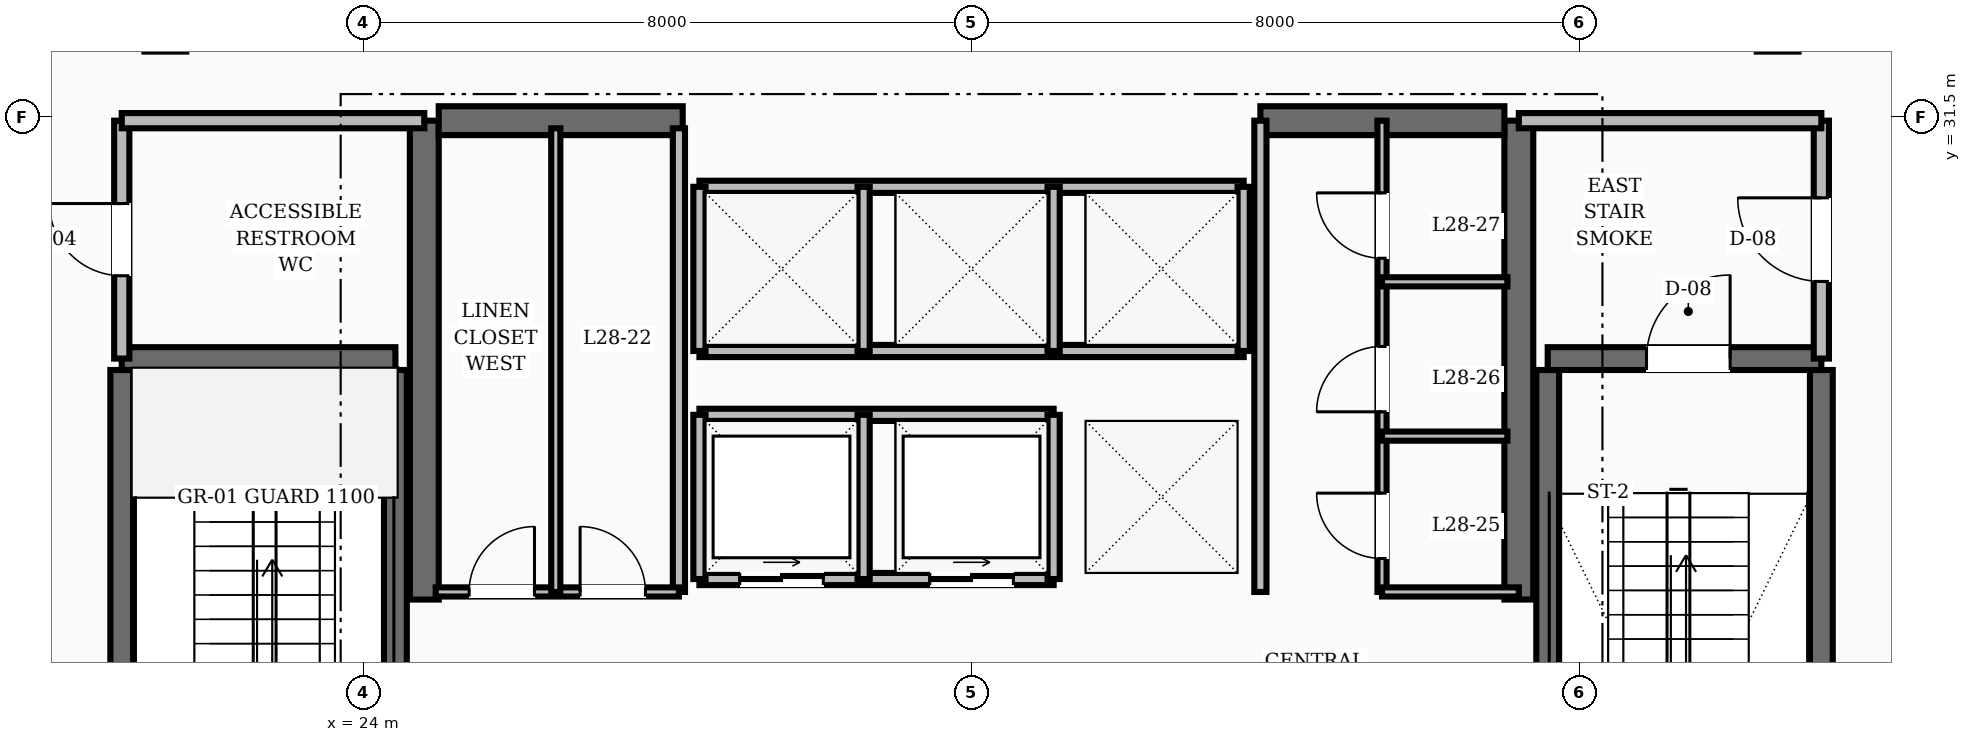
"""IFC4 building model, lengths in metres.
Left out: names, types, materials, properties, quantities, classifications, styles, units other than length and angle.
Written with IfcOpenShell. Run it as: python <this file> out.ifc"""

import sys

from ifc_helpers import new_model, si_unit, direction, frame, frame_2d, origin, place, context, subcontext, project, spatial, rectangle, extrude, element, fill, save


model = new_model("IFC4")
c1 = context("Model", 3, precision=1e-05, world=origin(), true_north=direction((0.0, 1.0)))
c2 = subcontext(c1, "Body", "Model", "MODEL_VIEW")
j1 = project(units=[si_unit("LENGTHUNIT", "METRE"), si_unit("PLANEANGLEUNIT", "RADIAN")], contexts=[c1])
p1 = place(None, origin())
s1 = spatial("IfcSite", under=j1, at=p1, CompositionType="ELEMENT")
p2 = place(p1, origin())
s2 = spatial("IfcBuilding", under=s1, at=p2, CompositionType="ELEMENT")
p3 = place(p2, frame((0.0, 0.0, 110.8)))
s3 = spatial("IfcBuildingStorey", under=s2, at=p3, CompositionType="ELEMENT", Elevation=110.8)
for number, where, z_axis, x_axis in (
    (1, (24.8, 25.15, 0.0), (0.0, 0.0, 1.0), (0.0, 1.0, 0.0)),
    (2, (39.2, 25.15, 0.0), (0.0, 0.0, 1.0), (0.0, 1.0, 0.0)),
):
    element("IfcWall", number, at=place(p3, frame(where, z_axis=z_axis, x_axis=x_axis)), inside=s3, PredefinedType="SHEAR", context=c2, shape_type="SweptSolid", body=[
        extrude(rectangle(XDim=6.3, YDim=0.38, at=frame_2d((3.15, 0.0))), origin(), (0.0, 0.0, 1.0), 6.4),
    ])
for number, where, z_axis, x_axis in (
    (3, (24.99, 31.45, 0.0), (0.0, 0.0, 1.0), (1.0, 0.0, 0.0)),
    (4, (35.8, 31.45, 0.0), (0.0, 0.0, 1.0), (1.0, 0.0, 0.0)),
):
    element("IfcWall", number, at=place(p3, frame(where, z_axis=z_axis, x_axis=x_axis)), inside=s3, PredefinedType="SHEAR", context=c2, shape_type="SweptSolid", body=[
        extrude(rectangle(XDim=3.21, YDim=0.38, at=frame_2d((1.605, 0.0))), origin(), (0.0, 0.0, 1.0), 6.4),
    ])
for number, where, z_axis, x_axis in (
    (5, (20.82, 19.43, 0.0), (0.0, 0.0, 1.0), (0.0, 1.0, 0.0)),
    (6, (24.42, 19.43, 0.0), (0.0, 0.0, 1.0), (0.0, 1.0, 0.0)),
):
    element("IfcWall", number, at=place(p3, frame(where, z_axis=z_axis, x_axis=x_axis)), inside=s3, PredefinedType="SHEAR", context=c2, shape_type="SweptSolid", body=[
        extrude(rectangle(XDim=8.74, YDim=0.3, at=frame_2d((4.37, 0.0))), origin(), (0.0, 0.0, 1.0), 6.4),
    ])
p4 = place(p3, frame((20.82, 28.32, 0.0), z_axis=(0.0, 0.0, 1.0), x_axis=(1.0, 0.0, 0.0)))
e7 = element("IfcWall", 7, at=p4, inside=s3, PredefinedType="SHEAR", context=c2, shape_type="SweptSolid", body=[
    extrude(rectangle(XDim=3.6, YDim=0.3, at=frame_2d((1.8, 0.0))), origin(), (0.0, 0.0, 1.0), 6.4),
])
for number, where, z_axis, x_axis in (
    (8, (43.18, 19.43, 0.0), (0.0, 0.0, 1.0), (0.0, 1.0, 0.0)),
    (9, (39.58, 19.43, 0.0), (0.0, 0.0, 1.0), (0.0, 1.0, 0.0)),
):
    element("IfcWall", number, at=place(p3, frame(where, z_axis=z_axis, x_axis=x_axis)), inside=s3, PredefinedType="SHEAR", context=c2, shape_type="SweptSolid", body=[
        extrude(rectangle(XDim=8.74, YDim=0.3, at=frame_2d((4.37, 0.0))), origin(), (0.0, 0.0, 1.0), 6.4),
    ])
p5 = place(p3, frame((39.58, 28.32, 0.0), z_axis=(0.0, 0.0, 1.0), x_axis=(1.0, 0.0, 0.0)))
e10 = element("IfcWall", 10, at=p5, inside=s3, PredefinedType="SHEAR", context=c2, shape_type="SweptSolid", body=[
    extrude(rectangle(XDim=3.6, YDim=0.3, at=frame_2d((1.8, 0.0))), origin(), (0.0, 0.0, 1.0), 6.4),
])
p6 = place(p5, frame((1.3, 0.0, 0.0)))
e11 = element("IfcOpeningElement", 11, at=p6, cuts=e10, PredefinedType="OPENING", context=c2, shape_type="SweptSolid", body=[
    extrude(rectangle(XDim=1.1, YDim=2.1, at=frame_2d((0.55, 1.05))), frame((0.0, 0.16, 0.0), z_axis=(0.0, -1.0, 0.0), x_axis=(1.0, 0.0, 0.0)), (0.0, 0.0, 1.0), 0.32),
])
p7 = place(p3, frame((43.18, 28.32, 0.0), z_axis=(0.0, 0.0, 1.0), x_axis=(0.0, 1.0, 0.0)))
e12 = element("IfcWall", 12, at=p7, inside=s3, PredefinedType="SOLIDWALL", context=c2, shape_type="SweptSolid", body=[
    extrude(rectangle(XDim=3.13, YDim=0.2, at=frame_2d((1.565, 0.0))), origin(), (0.0, 0.0, 1.0), 5.12),
])
p8 = place(p7, frame((1.015, 0.0, 0.0)))
e13 = element("IfcOpeningElement", 13, at=p8, cuts=e12, PredefinedType="OPENING", context=c2, shape_type="SweptSolid", body=[
    extrude(rectangle(XDim=1.1, YDim=2.1, at=frame_2d((0.55, 1.05))), frame((0.0, 0.11, 0.0), z_axis=(0.0, -1.0, 0.0), x_axis=(1.0, 0.0, 0.0)), (0.0, 0.0, 1.0), 0.22),
])
p9 = place(p3, frame((39.2, 31.45, 0.0), z_axis=(0.0, 0.0, 1.0), x_axis=(1.0, 0.0, 0.0)))
e14 = element("IfcWall", 14, at=p9, inside=s3, PredefinedType="SOLIDWALL", context=c2, shape_type="SweptSolid", body=[
    extrude(rectangle(XDim=3.98, YDim=0.2, at=frame_2d((1.99, 0.0))), origin(), (0.0, 0.0, 1.0), 5.12),
])
p10 = place(p3, frame((20.82, 28.32, 0.0), z_axis=(0.0, 0.0, 1.0), x_axis=(0.0, 1.0, 0.0)))
e15 = element("IfcWall", 15, at=p10, inside=s3, PredefinedType="SOLIDWALL", context=c2, shape_type="SweptSolid", body=[
    extrude(rectangle(XDim=3.13, YDim=0.2, at=frame_2d((1.565, 0.0))), origin(), (0.0, 0.0, 1.0), 5.12),
])
p11 = place(p10, frame((1.09, 0.0, 0.0)))
e16 = element("IfcOpeningElement", 16, at=p11, cuts=e15, PredefinedType="OPENING", context=c2, shape_type="SweptSolid", body=[
    extrude(rectangle(XDim=0.95, YDim=2.1, at=frame_2d((0.475, 1.05))), frame((0.0, 0.11, 0.0), z_axis=(0.0, -1.0, 0.0), x_axis=(1.0, 0.0, 0.0)), (0.0, 0.0, 1.0), 0.22),
])
p12 = place(p3, frame((20.82, 31.45, 0.0), z_axis=(0.0, 0.0, 1.0), x_axis=(1.0, 0.0, 0.0)))
e17 = element("IfcWall", 17, at=p12, inside=s3, PredefinedType="SOLIDWALL", context=c2, shape_type="SweptSolid", body=[
    extrude(rectangle(XDim=3.98, YDim=0.2, at=frame_2d((1.99, 0.0))), origin(), (0.0, 0.0, 1.0), 5.12),
])
p13 = place(p3, frame((35.8, 25.25, 0.0), z_axis=(0.0, 0.0, 1.0), x_axis=(0.0, 1.0, 0.0)))
e18 = element("IfcWall", 18, at=p13, inside=s3, PredefinedType="SOLIDWALL", context=c2, shape_type="SweptSolid", body=[
    extrude(rectangle(XDim=6.2, YDim=0.16, at=frame_2d((3.1, 0.0))), origin(), (0.0, 0.0, 1.0), 5.12),
])
for number, where, z_axis, x_axis in (
    (19, (28.42, 30.58, 0.0), (0.0, 0.0, 1.0), (1.0, 0.0, 0.0)),
    (20, (28.42, 28.42, 0.0), (0.0, 0.0, 1.0), (1.0, 0.0, 0.0)),
):
    element("IfcWall", number, at=place(p3, frame(where, z_axis=z_axis, x_axis=x_axis)), inside=s3, PredefinedType="SOLIDWALL", context=c2, shape_type="SweptSolid", body=[
        extrude(rectangle(XDim=7.16, YDim=0.16, at=frame_2d((3.58, 0.0))), origin(), (0.0, 0.0, 1.0), 5.12),
    ])
for number, where, z_axis, x_axis in (
    (21, (28.42, 28.42, 0.0), (0.0, 0.0, 1.0), (0.0, 1.0, 0.0)),
    (22, (30.58, 28.42, 0.0), (0.0, 0.0, 1.0), (0.0, 1.0, 0.0)),
    (23, (33.08, 28.42, 0.0), (0.0, 0.0, 1.0), (0.0, 1.0, 0.0)),
    (24, (35.58, 28.42, 0.0), (0.0, 0.0, 1.0), (0.0, 1.0, 0.0)),
):
    element("IfcWall", number, at=place(p3, frame(where, z_axis=z_axis, x_axis=x_axis)), inside=s3, PredefinedType="SOLIDWALL", context=c2, shape_type="SweptSolid", body=[
        extrude(rectangle(XDim=2.16, YDim=0.16, at=frame_2d((1.08, 0.0))), origin(), (0.0, 0.0, 1.0), 5.12),
    ])
p14 = place(p3, frame((28.42, 25.42, 0.0), z_axis=(0.0, 0.0, 1.0), x_axis=(1.0, 0.0, 0.0)))
e25 = element("IfcWall", 25, at=p14, inside=s3, PredefinedType="SOLIDWALL", context=c2, shape_type="SweptSolid", body=[
    extrude(rectangle(XDim=4.66, YDim=0.16, at=frame_2d((2.33, 0.0))), origin(), (0.0, 0.0, 1.0), 5.12),
])
p15 = place(p14, frame((0.53, 0.0, 0.0)))
e26 = element("IfcOpeningElement", 26, at=p15, cuts=e25, PredefinedType="OPENING", context=c2, shape_type="SweptSolid", body=[
    extrude(rectangle(XDim=1.1, YDim=2.15, at=frame_2d((0.55, 1.075))), frame((0.0, 0.09, 0.0), z_axis=(0.0, -1.0, 0.0), x_axis=(1.0, 0.0, 0.0)), (0.0, 0.0, 1.0), 0.18),
])
p16 = place(p14, frame((3.03, 0.0, 0.0)))
e27 = element("IfcOpeningElement", 27, at=p16, cuts=e25, PredefinedType="OPENING", context=c2, shape_type="SweptSolid", body=[
    extrude(rectangle(XDim=1.1, YDim=2.15, at=frame_2d((0.55, 1.075))), frame((0.0, 0.09, 0.0), z_axis=(0.0, -1.0, 0.0), x_axis=(1.0, 0.0, 0.0)), (0.0, 0.0, 1.0), 0.18),
])
p17 = place(p3, frame((28.42, 27.58, 0.0), z_axis=(0.0, 0.0, 1.0), x_axis=(1.0, 0.0, 0.0)))
e28 = element("IfcWall", 28, at=p17, inside=s3, PredefinedType="SOLIDWALL", context=c2, shape_type="SweptSolid", body=[
    extrude(rectangle(XDim=4.66, YDim=0.16, at=frame_2d((2.33, 0.0))), origin(), (0.0, 0.0, 1.0), 5.12),
])
for number, where, z_axis, x_axis in (
    (29, (28.42, 25.42, 0.0), (0.0, 0.0, 1.0), (0.0, 1.0, 0.0)),
    (30, (30.58, 25.42, 0.0), (0.0, 0.0, 1.0), (0.0, 1.0, 0.0)),
    (31, (33.08, 25.42, 0.0), (0.0, 0.0, 1.0), (0.0, 1.0, 0.0)),
):
    element("IfcWall", number, at=place(p3, frame(where, z_axis=z_axis, x_axis=x_axis)), inside=s3, PredefinedType="SOLIDWALL", context=c2, shape_type="SweptSolid", body=[
        extrude(rectangle(XDim=2.16, YDim=0.16, at=frame_2d((1.08, 0.0))), origin(), (0.0, 0.0, 1.0), 5.12),
    ])
p18 = place(p3, frame((28.15, 25.25, 0.0), z_axis=(0.0, 0.0, 1.0), x_axis=(0.0, 1.0, 0.0)))
e32 = element("IfcWall", 32, at=p18, inside=s3, PredefinedType="SOLIDWALL", context=c2, shape_type="SweptSolid", body=[
    extrude(rectangle(XDim=6.1, YDim=0.16, at=frame_2d((3.05, 0.0))), origin(), (0.0, 0.0, 1.0), 5.12),
])
p19 = place(p3, frame((24.95, 25.25, 0.0), z_axis=(0.0, 0.0, 1.0), x_axis=(1.0, 0.0, 0.0)))
e33 = element("IfcWall", 33, at=p19, inside=s3, PredefinedType="PARTITIONING", context=c2, shape_type="SweptSolid", body=[
    extrude(rectangle(XDim=3.2, YDim=0.12, at=frame_2d((1.6, 0.0))), origin(), (0.0, 0.0, 1.0), 5.12),
])
p20 = place(p19, frame((0.44, 0.0, 0.0)))
e34 = element("IfcOpeningElement", 34, at=p20, cuts=e33, PredefinedType="OPENING", context=c2, shape_type="SweptSolid", body=[
    extrude(rectangle(XDim=0.86, YDim=2.1, at=frame_2d((0.43, 1.05))), frame((0.0, 0.07, 0.0), z_axis=(0.0, -1.0, 0.0), x_axis=(1.0, 0.0, 0.0)), (0.0, 0.0, 1.0), 0.14),
])
p21 = place(p19, frame((1.9, 0.0, 0.0)))
e35 = element("IfcOpeningElement", 35, at=p21, cuts=e33, PredefinedType="OPENING", context=c2, shape_type="SweptSolid", body=[
    extrude(rectangle(XDim=0.86, YDim=2.1, at=frame_2d((0.43, 1.05))), frame((0.0, 0.07, 0.0), z_axis=(0.0, -1.0, 0.0), x_axis=(1.0, 0.0, 0.0)), (0.0, 0.0, 1.0), 0.14),
])
p22 = place(p3, frame((37.4, 25.25, 0.0), z_axis=(0.0, 0.0, 1.0), x_axis=(0.0, 1.0, 0.0)))
e36 = element("IfcWall", 36, at=p22, inside=s3, PredefinedType="PARTITIONING", context=c2, shape_type="SweptSolid", body=[
    extrude(rectangle(XDim=6.2, YDim=0.12, at=frame_2d((3.1, 0.0))), origin(), (0.0, 0.0, 1.0), 5.12),
])
p23 = place(p22, frame((0.44, 0.0, 0.0)))
e37 = element("IfcOpeningElement", 37, at=p23, cuts=e36, PredefinedType="OPENING", context=c2, shape_type="SweptSolid", body=[
    extrude(rectangle(XDim=0.86, YDim=2.1, at=frame_2d((0.43, 1.05))), frame((0.0, 0.07, 0.0), z_axis=(0.0, -1.0, 0.0), x_axis=(1.0, 0.0, 0.0)), (0.0, 0.0, 1.0), 0.14),
])
p24 = place(p22, frame((2.37, 0.0, 0.0)))
e38 = element("IfcOpeningElement", 38, at=p24, cuts=e36, PredefinedType="OPENING", context=c2, shape_type="SweptSolid", body=[
    extrude(rectangle(XDim=0.86, YDim=2.1, at=frame_2d((0.43, 1.05))), frame((0.0, 0.07, 0.0), z_axis=(0.0, -1.0, 0.0), x_axis=(1.0, 0.0, 0.0)), (0.0, 0.0, 1.0), 0.14),
])
p25 = place(p22, frame((4.39, 0.0, 0.0)))
e39 = element("IfcOpeningElement", 39, at=p25, cuts=e36, PredefinedType="OPENING", context=c2, shape_type="SweptSolid", body=[
    extrude(rectangle(XDim=0.86, YDim=2.1, at=frame_2d((0.43, 1.05))), frame((0.0, 0.07, 0.0), z_axis=(0.0, -1.0, 0.0), x_axis=(1.0, 0.0, 0.0)), (0.0, 0.0, 1.0), 0.14),
])
p26 = place(p3, frame((37.4, 25.25, 0.0), z_axis=(0.0, 0.0, 1.0), x_axis=(1.0, 0.0, 0.0)))
e40 = element("IfcWall", 40, at=p26, inside=s3, PredefinedType="PARTITIONING", context=c2, shape_type="SweptSolid", body=[
    extrude(rectangle(XDim=1.8, YDim=0.12, at=frame_2d((0.9, 0.0))), origin(), (0.0, 0.0, 1.0), 5.12),
])
p27 = place(p3, frame((26.53, 25.25, 0.0), z_axis=(0.0, 0.0, 1.0), x_axis=(0.0, 1.0, 0.0)))
e41 = element("IfcWall", 41, at=p27, inside=s3, PredefinedType="PARTITIONING", context=c2, shape_type="SweptSolid", body=[
    extrude(rectangle(XDim=6.1, YDim=0.12, at=frame_2d((3.05, 0.0))), origin(), (0.0, 0.0, 1.0), 5.12),
])
for number, where, z_axis, x_axis in (
    (42, (37.4, 27.3, 0.0), (0.0, 0.0, 1.0), (1.0, 0.0, 0.0)),
    (43, (37.4, 29.33, 0.0), (0.0, 0.0, 1.0), (1.0, 0.0, 0.0)),
):
    element("IfcWall", number, at=place(p3, frame(where, z_axis=z_axis, x_axis=x_axis)), inside=s3, PredefinedType="PARTITIONING", context=c2, shape_type="SweptSolid", body=[
        extrude(rectangle(XDim=1.65, YDim=0.12, at=frame_2d((0.825, 0.0))), origin(), (0.0, 0.0, 1.0), 5.12),
    ])
p28 = place(p6, origin())
e44 = element("IfcDoor", 44, at=p28, inside=s3, OperationType="SINGLE_SWING_RIGHT", PredefinedType="DOOR", context=c2, shape_type="SweptSolid", body=[
    extrude(rectangle(XDim=1.1, YDim=2.1, at=frame_2d((0.55, 1.05))), frame((0.0, 0.025, 0.0), z_axis=(0.0, -1.0, 0.0), x_axis=(1.0, 0.0, 0.0)), (0.0, 0.0, 1.0), 0.05),
])
fill(e11, e44)
p29 = place(p8, origin())
e45 = element("IfcDoor", 45, at=p29, inside=s3, OperationType="SINGLE_SWING_RIGHT", PredefinedType="DOOR", context=c2, shape_type="SweptSolid", body=[
    extrude(rectangle(XDim=1.1, YDim=2.1, at=frame_2d((0.55, 1.05))), frame((0.0, 0.025, 0.0), z_axis=(0.0, -1.0, 0.0), x_axis=(1.0, 0.0, 0.0)), (0.0, 0.0, 1.0), 0.05),
])
fill(e13, e45)
p30 = place(p11, origin())
e46 = element("IfcDoor", 46, at=p30, inside=s3, OperationType="SINGLE_SWING_RIGHT", PredefinedType="DOOR", context=c2, shape_type="SweptSolid", body=[
    extrude(rectangle(XDim=0.95, YDim=2.1, at=frame_2d((0.475, 1.05))), frame((0.0, 0.025, 0.0), z_axis=(0.0, -1.0, 0.0), x_axis=(1.0, 0.0, 0.0)), (0.0, 0.0, 1.0), 0.05),
])
fill(e16, e46)
p31 = place(p15, origin())
e47 = element("IfcDoor", 47, at=p31, inside=s3, OperationType="SLIDING_TO_RIGHT", PredefinedType="DOOR", context=c2, shape_type="SweptSolid", body=[
    extrude(rectangle(XDim=1.1, YDim=2.15, at=frame_2d((0.55, 1.075))), frame((0.0, 0.025, 0.0), z_axis=(0.0, -1.0, 0.0), x_axis=(1.0, 0.0, 0.0)), (0.0, 0.0, 1.0), 0.05),
])
fill(e26, e47)
p32 = place(p16, origin())
e48 = element("IfcDoor", 48, at=p32, inside=s3, OperationType="SLIDING_TO_RIGHT", PredefinedType="DOOR", context=c2, shape_type="SweptSolid", body=[
    extrude(rectangle(XDim=1.1, YDim=2.15, at=frame_2d((0.55, 1.075))), frame((0.0, 0.025, 0.0), z_axis=(0.0, -1.0, 0.0), x_axis=(1.0, 0.0, 0.0)), (0.0, 0.0, 1.0), 0.05),
])
fill(e27, e48)
p33 = place(p20, origin())
e49 = element("IfcDoor", 49, at=p33, inside=s3, OperationType="SINGLE_SWING_RIGHT", PredefinedType="DOOR", context=c2, shape_type="SweptSolid", body=[
    extrude(rectangle(XDim=0.86, YDim=2.1, at=frame_2d((0.43, 1.05))), frame((0.0, 0.025, 0.0), z_axis=(0.0, -1.0, 0.0), x_axis=(1.0, 0.0, 0.0)), (0.0, 0.0, 1.0), 0.05),
])
fill(e34, e49)
p34 = place(p21, origin())
e50 = element("IfcDoor", 50, at=p34, inside=s3, OperationType="SINGLE_SWING_LEFT", PredefinedType="DOOR", context=c2, shape_type="SweptSolid", body=[
    extrude(rectangle(XDim=0.86, YDim=2.1, at=frame_2d((0.43, 1.05))), frame((0.0, 0.025, 0.0), z_axis=(0.0, -1.0, 0.0), x_axis=(1.0, 0.0, 0.0)), (0.0, 0.0, 1.0), 0.05),
])
fill(e35, e50)
p35 = place(p23, origin())
e51 = element("IfcDoor", 51, at=p35, inside=s3, OperationType="SINGLE_SWING_RIGHT", PredefinedType="DOOR", context=c2, shape_type="SweptSolid", body=[
    extrude(rectangle(XDim=0.86, YDim=2.1, at=frame_2d((0.43, 1.05))), frame((0.0, 0.025, 0.0), z_axis=(0.0, -1.0, 0.0), x_axis=(1.0, 0.0, 0.0)), (0.0, 0.0, 1.0), 0.05),
])
fill(e37, e51)
p36 = place(p24, origin())
e52 = element("IfcDoor", 52, at=p36, inside=s3, OperationType="SINGLE_SWING_LEFT", PredefinedType="DOOR", context=c2, shape_type="SweptSolid", body=[
    extrude(rectangle(XDim=0.86, YDim=2.1, at=frame_2d((0.43, 1.05))), frame((0.0, 0.025, 0.0), z_axis=(0.0, -1.0, 0.0), x_axis=(1.0, 0.0, 0.0)), (0.0, 0.0, 1.0), 0.05),
])
fill(e38, e52)
p37 = place(p25, origin())
e53 = element("IfcDoor", 53, at=p37, inside=s3, OperationType="SINGLE_SWING_RIGHT", PredefinedType="DOOR", context=c2, shape_type="SweptSolid", body=[
    extrude(rectangle(XDim=0.86, YDim=2.1, at=frame_2d((0.43, 1.05))), frame((0.0, 0.025, 0.0), z_axis=(0.0, -1.0, 0.0), x_axis=(1.0, 0.0, 0.0)), (0.0, 0.0, 1.0), 0.05),
])
fill(e39, e53)
save(model, sys.argv[1])
